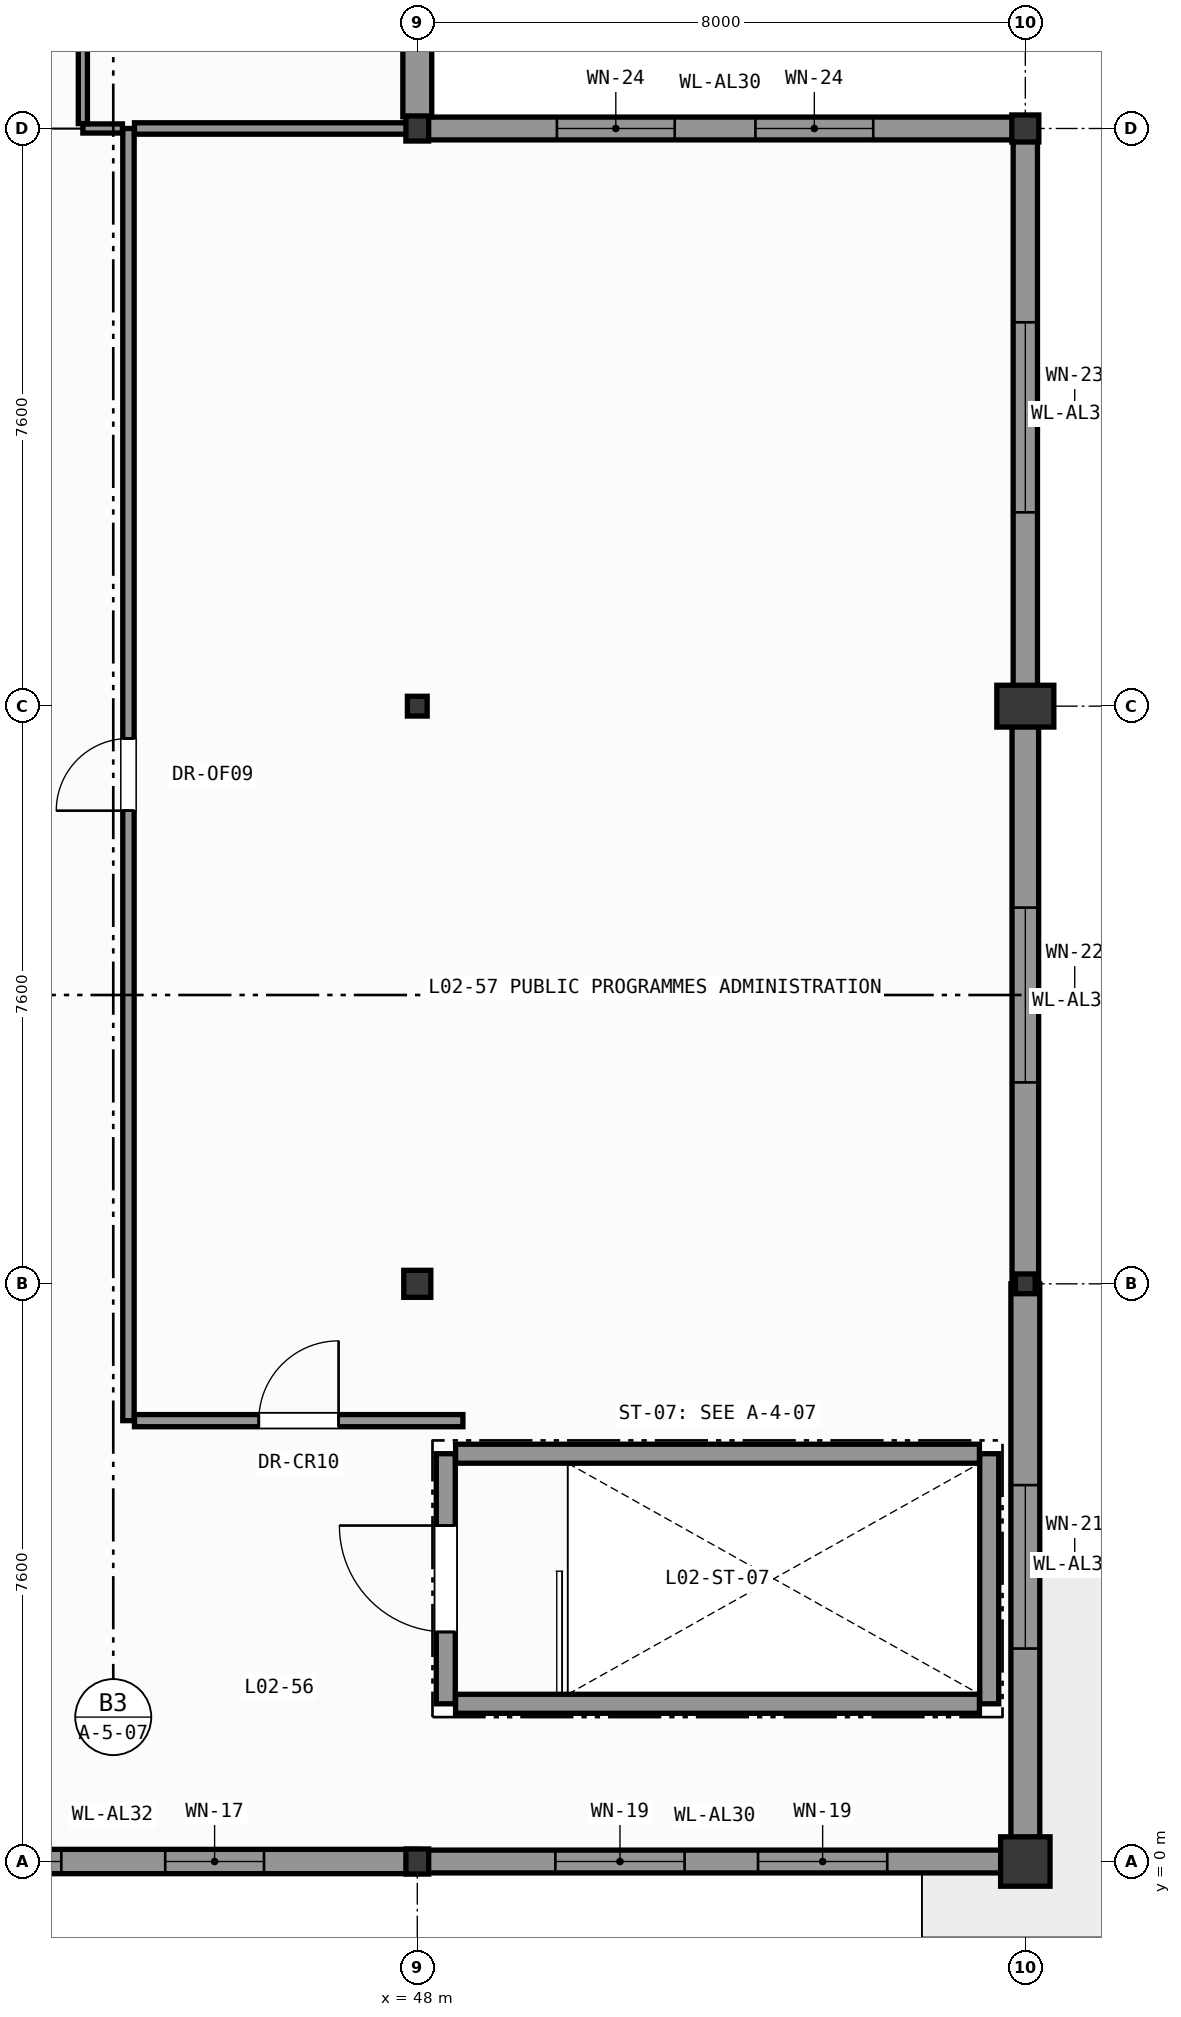
"""IFC4 building model, lengths in metres.
Left out: names, types, materials, properties, quantities, classifications, styles, units other than length and angle.
Written with IfcOpenShell. Run it as: python <this file> out.ifc"""

import sys

from ifc_helpers import new_model, si_unit, direction, frame, frame_2d, origin, origin_2d, place, context, subcontext, project, spatial, rectangle, hollow_rectangle, hollow_circle, i_section, extrude, element, fill, save


model = new_model("IFC4")
c1 = context("Model", 3, precision=1e-05, world=origin(), true_north=direction((0.0, 1.0)))
c2 = subcontext(c1, "Body", "Model", "MODEL_VIEW")
j1 = project(units=[si_unit("LENGTHUNIT", "METRE"), si_unit("PLANEANGLEUNIT", "RADIAN")], contexts=[c1])
p1 = place(None, origin())
s1 = spatial("IfcSite", under=j1, at=p1, CompositionType="ELEMENT")
p2 = place(p1, origin())
s2 = spatial("IfcBuilding", under=s1, at=p2, CompositionType="ELEMENT")
p3 = place(p2, frame((0.0, 0.0, 7.8)))
s3 = spatial("IfcBuildingStorey", under=s2, at=p3, CompositionType="ELEMENT", Elevation=7.8)
p4 = place(p3, frame((48.0, 0.0, 0.0), z_axis=(0.0, 0.0, 1.0), x_axis=(1.0, 0.0, 0.0)))
e1 = element("IfcColumn", 1, at=p4, inside=s3, PredefinedType="COLUMN", context=c2, shape_type="SweptSolid", body=[
    extrude(i_section(OverallWidth=0.3, OverallDepth=0.33, WebThickness=0.01, FlangeThickness=0.017, FilletRadius=0.027, at=origin_2d()), origin(), (0.0, 0.0, 1.0), 5.4),
])
p5 = place(p3, frame((48.0, 7.6, 0.0), z_axis=(0.0, 0.0, 1.0), x_axis=(1.0, 0.0, 0.0)))
e2 = element("IfcColumn", 2, at=p5, inside=s3, PredefinedType="COLUMN", context=c2, shape_type="SweptSolid", body=[
    extrude(hollow_circle(Radius=0.178, WallThickness=0.016, at=origin_2d()), origin(), (0.0, 0.0, 1.0), 5.4),
])
p6 = place(p3, frame((48.0, 15.2, 0.0), z_axis=(0.0, 0.0, 1.0), x_axis=(1.0, 0.0, 0.0)))
e3 = element("IfcColumn", 3, at=p6, inside=s3, PredefinedType="COLUMN", context=c2, shape_type="SweptSolid", body=[
    extrude(hollow_rectangle(XDim=0.26, YDim=0.26, WallThickness=0.012, InnerFilletRadius=0.012, OuterFilletRadius=0.025, at=origin_2d()), origin(), (0.0, 0.0, 1.0), 5.4),
])
p7 = place(p3, frame((48.0, 22.8, 0.0), z_axis=(0.0, 0.0, 1.0), x_axis=(1.0, 0.0, 0.0)))
e4 = element("IfcColumn", 4, at=p7, inside=s3, PredefinedType="COLUMN", context=c2, shape_type="SweptSolid", body=[
    extrude(i_section(OverallWidth=0.3, OverallDepth=0.33, WebThickness=0.01, FlangeThickness=0.017, FilletRadius=0.027, at=origin_2d()), origin(), (0.0, 0.0, 1.0), 5.4),
])
p8 = place(p3, frame((56.0, 0.0, 0.0), z_axis=(0.0, 0.0, 1.0), x_axis=(1.0, 0.0, 0.0)))
e5 = element("IfcColumn", 5, at=p8, inside=s3, PredefinedType="PILASTER", context=c2, shape_type="SweptSolid", body=[
    extrude(rectangle(XDim=0.65, YDim=0.65, at=origin_2d()), origin(), (0.0, 0.0, 1.0), 5.4),
])
p9 = place(p3, frame((56.0, 7.6, 0.0), z_axis=(0.0, 0.0, 1.0), x_axis=(1.0, 0.0, 0.0)))
e6 = element("IfcColumn", 6, at=p9, inside=s3, PredefinedType="COLUMN", context=c2, shape_type="SweptSolid", body=[
    extrude(hollow_rectangle(XDim=0.26, YDim=0.26, WallThickness=0.012, InnerFilletRadius=0.012, OuterFilletRadius=0.025, at=origin_2d()), origin(), (0.0, 0.0, 1.0), 5.4),
])
p10 = place(p3, frame((56.0, 15.2, 0.0), z_axis=(0.0, 0.0, 1.0), x_axis=(1.0, 0.0, 0.0)))
e7 = element("IfcColumn", 7, at=p10, inside=s3, PredefinedType="PILASTER", context=c2, shape_type="SweptSolid", body=[
    extrude(rectangle(XDim=0.75, YDim=0.55, at=origin_2d()), origin(), (0.0, 0.0, 1.0), 5.4),
])
p11 = place(p3, frame((56.0, 22.8, 0.0), z_axis=(0.0, 0.0, 1.0), x_axis=(1.0, 0.0, 0.0)))
e8 = element("IfcColumn", 8, at=p11, inside=s3, PredefinedType="COLUMN", context=c2, shape_type="SweptSolid", body=[
    extrude(hollow_circle(Radius=0.178, WallThickness=0.016, at=origin_2d()), origin(), (0.0, 0.0, 1.0), 5.4),
])
p12 = place(p3, frame((48.0, 0.0, 0.0), z_axis=(0.0, 0.0, 1.0), x_axis=(-1.0, 0.0, 0.0)))
e9 = element("IfcWall", 9, at=p12, inside=s3, PredefinedType="SOLIDWALL", context=c2, shape_type="SweptSolid", body=[
    extrude(rectangle(XDim=8.0, YDim=0.32, at=frame_2d((4.0, 0.0))), origin(), (0.0, 0.0, 1.0), 4.745),
])
p13 = place(p12, frame((2.017, 0.0, 0.95)))
e10 = element("IfcOpeningElement", 10, at=p13, cuts=e9, PredefinedType="OPENING", context=c2, shape_type="SweptSolid", body=[
    extrude(rectangle(XDim=1.3, YDim=2.3, at=frame_2d((0.65, 1.15))), frame((0.0, 0.17, 0.0), z_axis=(0.0, -1.0, 0.0), x_axis=(1.0, 0.0, 0.0)), (0.0, 0.0, 1.0), 0.34),
])
p14 = place(p12, frame((4.683, 0.0, 0.95)))
e11 = element("IfcOpeningElement", 11, at=p14, cuts=e9, PredefinedType="OPENING", context=c2, shape_type="SweptSolid", body=[
    extrude(rectangle(XDim=1.3, YDim=2.3, at=frame_2d((0.65, 1.15))), frame((0.0, 0.17, 0.0), z_axis=(0.0, -1.0, 0.0), x_axis=(1.0, 0.0, 0.0)), (0.0, 0.0, 1.0), 0.34),
])
p15 = place(p3, frame((56.0, 0.0, 0.0), z_axis=(0.0, 0.0, 1.0), x_axis=(-1.0, 0.0, 0.0)))
e12 = element("IfcWall", 12, at=p15, inside=s3, PredefinedType="SOLIDWALL", context=c2, shape_type="SweptSolid", body=[
    extrude(rectangle(XDim=8.0, YDim=0.3, at=frame_2d((4.0, 0.0))), origin(), (0.0, 0.0, 1.0), 4.745),
])
p16 = place(p15, frame((1.817, 0.0, 0.95)))
e13 = element("IfcOpeningElement", 13, at=p16, cuts=e12, PredefinedType="OPENING", context=c2, shape_type="SweptSolid", body=[
    extrude(rectangle(XDim=1.7, YDim=2.7, at=frame_2d((0.85, 1.35))), frame((0.0, 0.16, 0.0), z_axis=(0.0, -1.0, 0.0), x_axis=(1.0, 0.0, 0.0)), (0.0, 0.0, 1.0), 0.32),
])
p17 = place(p15, frame((4.483, 0.0, 0.95)))
e14 = element("IfcOpeningElement", 14, at=p17, cuts=e12, PredefinedType="OPENING", context=c2, shape_type="SweptSolid", body=[
    extrude(rectangle(XDim=1.7, YDim=2.7, at=frame_2d((0.85, 1.35))), frame((0.0, 0.16, 0.0), z_axis=(0.0, -1.0, 0.0), x_axis=(1.0, 0.0, 0.0)), (0.0, 0.0, 1.0), 0.32),
])
p18 = place(p3, frame((56.0, 7.6, 0.0), z_axis=(0.0, 0.0, 1.0), x_axis=(0.0, -1.0, 0.0)))
e15 = element("IfcWall", 15, at=p18, inside=s3, PredefinedType="SOLIDWALL", context=c2, shape_type="SweptSolid", body=[
    extrude(rectangle(XDim=7.446, YDim=0.38, at=frame_2d((3.723, 0.0))), origin(), (0.0, 0.0, 1.0), 4.635),
])
p19 = place(p18, frame((2.648, 0.0, 0.95)))
e16 = element("IfcOpeningElement", 16, at=p19, cuts=e15, PredefinedType="OPENING", context=c2, shape_type="SweptSolid", body=[
    extrude(rectangle(XDim=2.15, YDim=3.1, at=frame_2d((1.075, 1.55))), frame((0.0, 0.2, 0.0), z_axis=(0.0, -1.0, 0.0), x_axis=(1.0, 0.0, 0.0)), (0.0, 0.0, 1.0), 0.4),
])
p20 = place(p3, frame((56.0, 15.2, 0.0), z_axis=(0.0, 0.0, 1.0), x_axis=(0.0, -1.0, 0.0)))
e17 = element("IfcWall", 17, at=p20, inside=s3, PredefinedType="SOLIDWALL", context=c2, shape_type="SweptSolid", body=[
    extrude(rectangle(XDim=7.6, YDim=0.35, at=frame_2d((3.8, 0.0))), origin(), (0.0, 0.0, 1.0), 4.635),
])
p21 = place(p20, frame((2.65, 0.0, 0.95)))
e18 = element("IfcOpeningElement", 18, at=p21, cuts=e17, PredefinedType="OPENING", context=c2, shape_type="SweptSolid", body=[
    extrude(rectangle(XDim=2.3, YDim=3.29, at=frame_2d((1.15, 1.645))), frame((0.0, 0.185, 0.0), z_axis=(0.0, -1.0, 0.0), x_axis=(1.0, 0.0, 0.0)), (0.0, 0.0, 1.0), 0.37),
])
p22 = place(p3, frame((56.0, 22.8, 0.0), z_axis=(0.0, 0.0, 1.0), x_axis=(0.0, -1.0, 0.0)))
e19 = element("IfcWall", 19, at=p22, inside=s3, PredefinedType="SOLIDWALL", context=c2, shape_type="SweptSolid", body=[
    extrude(rectangle(XDim=7.6, YDim=0.32, at=frame_2d((3.8, 0.0))), origin(), (0.0, 0.0, 1.0), 4.635),
])
p23 = place(p22, frame((2.55, 0.0, 0.95)))
e20 = element("IfcOpeningElement", 20, at=p23, cuts=e19, PredefinedType="OPENING", context=c2, shape_type="SweptSolid", body=[
    extrude(rectangle(XDim=2.5, YDim=3.29, at=frame_2d((1.25, 1.645))), frame((0.0, 0.17, 0.0), z_axis=(0.0, -1.0, 0.0), x_axis=(1.0, 0.0, 0.0)), (0.0, 0.0, 1.0), 0.34),
])
p24 = place(p3, frame((48.0, 22.8, 0.0), z_axis=(0.0, 0.0, 1.0), x_axis=(1.0, 0.0, 0.0)))
e21 = element("IfcWall", 21, at=p24, inside=s3, PredefinedType="SOLIDWALL", context=c2, shape_type="SweptSolid", body=[
    extrude(rectangle(XDim=7.836, YDim=0.3, at=frame_2d((3.918, 0.0))), origin(), (0.0, 0.0, 1.0), 4.785),
])
p25 = place(p24, frame((1.837, 0.0, 0.95)))
e22 = element("IfcOpeningElement", 22, at=p25, cuts=e21, PredefinedType="OPENING", context=c2, shape_type="SweptSolid", body=[
    extrude(rectangle(XDim=1.55, YDim=2.1, at=frame_2d((0.775, 1.05))), frame((0.0, 0.16, 0.0), z_axis=(0.0, -1.0, 0.0), x_axis=(1.0, 0.0, 0.0)), (0.0, 0.0, 1.0), 0.32),
])
p26 = place(p24, frame((4.449, 0.0, 0.95)))
e23 = element("IfcOpeningElement", 23, at=p26, cuts=e21, PredefinedType="OPENING", context=c2, shape_type="SweptSolid", body=[
    extrude(rectangle(XDim=1.55, YDim=2.1, at=frame_2d((0.775, 1.05))), frame((0.0, 0.16, 0.0), z_axis=(0.0, -1.0, 0.0), x_axis=(1.0, 0.0, 0.0)), (0.0, 0.0, 1.0), 0.32),
])
p27 = place(p3, frame((48.0, 30.4, 0.0), z_axis=(0.0, 0.0, 1.0), x_axis=(0.0, -1.0, 0.0)))
e24 = element("IfcWall", 24, at=p27, inside=s3, PredefinedType="SOLIDWALL", context=c2, shape_type="SweptSolid", body=[
    extrude(rectangle(XDim=7.446, YDim=0.38, at=frame_2d((3.723, 0.0))), origin(), (0.0, 0.0, 1.0), 4.685),
])
p28 = place(p27, frame((1.507, 0.0, 0.95)))
e25 = element("IfcOpeningElement", 25, at=p28, cuts=e24, PredefinedType="OPENING", context=c2, shape_type="SweptSolid", body=[
    extrude(rectangle(XDim=1.95, YDim=2.55, at=frame_2d((0.975, 1.275))), frame((0.0, 0.2, 0.0), z_axis=(0.0, -1.0, 0.0), x_axis=(1.0, 0.0, 0.0)), (0.0, 0.0, 1.0), 0.4),
])
p29 = place(p27, frame((3.989, 0.0, 0.95)))
e26 = element("IfcOpeningElement", 26, at=p29, cuts=e24, PredefinedType="OPENING", context=c2, shape_type="SweptSolid", body=[
    extrude(rectangle(XDim=1.95, YDim=2.55, at=frame_2d((0.975, 1.275))), frame((0.0, 0.2, 0.0), z_axis=(0.0, -1.0, 0.0), x_axis=(1.0, 0.0, 0.0)), (0.0, 0.0, 1.0), 0.4),
])
p30 = place(p3, frame((48.375, 2.075, 0.0), z_axis=(0.0, 0.0, 1.0), x_axis=(0.0, 1.0, 0.0)))
e27 = element("IfcWall", 27, at=p30, inside=s3, PredefinedType="SHEAR", context=c2, shape_type="SweptSolid", body=[
    extrude(rectangle(XDim=3.29, YDim=0.25, at=frame_2d((1.645, 0.0))), origin(), (0.0, 0.0, 1.0), 5.15),
])
p31 = place(p30, frame((0.945, 0.0, 0.0)))
e28 = element("IfcOpeningElement", 28, at=p31, cuts=e27, PredefinedType="OPENING", context=c2, shape_type="SweptSolid", body=[
    extrude(rectangle(XDim=1.4, YDim=2.2, at=frame_2d((0.7, 1.1))), frame((0.0, 0.135, 0.0), z_axis=(0.0, -1.0, 0.0), x_axis=(1.0, 0.0, 0.0)), (0.0, 0.0, 1.0), 0.27),
])
p32 = place(p3, frame((55.525, 2.075, 0.0), z_axis=(0.0, 0.0, 1.0), x_axis=(0.0, 1.0, 0.0)))
e29 = element("IfcWall", 29, at=p32, inside=s3, PredefinedType="SHEAR", context=c2, shape_type="SweptSolid", body=[
    extrude(rectangle(XDim=3.29, YDim=0.25, at=frame_2d((1.645, 0.0))), origin(), (0.0, 0.0, 1.0), 5.15),
])
for number, where, z_axis, x_axis in (
    (30, (48.504, 2.075, 0.0), (0.0, 0.0, 1.0), (1.0, 0.0, 0.0)),
    (31, (48.504, 5.365, 0.0), (0.0, 0.0, 1.0), (1.0, 0.0, 0.0)),
):
    element("IfcWall", number, at=place(p3, frame(where, z_axis=z_axis, x_axis=x_axis)), inside=s3, PredefinedType="SHEAR", context=c2, shape_type="SweptSolid", body=[
        extrude(rectangle(XDim=6.892, YDim=0.25, at=frame_2d((3.446, 0.0))), origin(), (0.0, 0.0, 1.0), 5.15),
    ])
p33 = place(p3, frame((44.2, 5.8, 0.0), z_axis=(0.0, 0.0, 1.0), x_axis=(0.0, 1.0, 0.0)))
e32 = element("IfcWall", 32, at=p33, inside=s3, PredefinedType="PARTITIONING", context=c2, shape_type="SweptSolid", body=[
    extrude(rectangle(XDim=17.0, YDim=0.15, at=frame_2d((8.5, 0.0))), origin(), (0.0, 0.0, 1.0), 5.15),
])
p34 = place(p33, frame((8.025, 0.0, 0.0)))
e33 = element("IfcOpeningElement", 33, at=p34, cuts=e32, PredefinedType="OPENING", context=c2, shape_type="SweptSolid", body=[
    extrude(rectangle(XDim=0.95, YDim=2.1, at=frame_2d((0.475, 1.05))), frame((0.0, 0.085, 0.0), z_axis=(0.0, -1.0, 0.0), x_axis=(1.0, 0.0, 0.0)), (0.0, 0.0, 1.0), 0.17),
])
p35 = place(p3, frame((43.6, 22.8, 0.0), z_axis=(0.0, 0.0, 1.0), x_axis=(1.0, 0.0, 0.0)))
e34 = element("IfcWall", 34, at=p35, inside=s3, PredefinedType="PARTITIONING", context=c2, shape_type="SweptSolid", body=[
    extrude(rectangle(XDim=0.521, YDim=0.12, at=frame_2d((0.26, 0.0))), origin(), (0.0, 0.0, 1.0), 4.785),
])
p36 = place(p3, frame((44.279, 5.8, 0.0), z_axis=(0.0, 0.0, 1.0), x_axis=(1.0, 0.0, 0.0)))
e35 = element("IfcWall", 35, at=p36, inside=s3, PredefinedType="PARTITIONING", context=c2, shape_type="SweptSolid", body=[
    extrude(rectangle(XDim=4.321, YDim=0.16, at=frame_2d((2.161, 0.0))), origin(), (0.0, 0.0, 1.0), 5.15),
])
p37 = place(p36, frame((1.635, 0.0, 0.0)))
e36 = element("IfcOpeningElement", 36, at=p37, cuts=e35, PredefinedType="OPENING", context=c2, shape_type="SweptSolid", body=[
    extrude(rectangle(XDim=1.05, YDim=2.2, at=frame_2d((0.525, 1.1))), frame((0.0, 0.09, 0.0), z_axis=(0.0, -1.0, 0.0), x_axis=(1.0, 0.0, 0.0)), (0.0, 0.0, 1.0), 0.18),
])
p38 = place(p3, frame((44.279, 22.8, 0.0), z_axis=(0.0, 0.0, 1.0), x_axis=(1.0, 0.0, 0.0)))
e37 = element("IfcWall", 37, at=p38, inside=s3, PredefinedType="PARTITIONING", context=c2, shape_type="SweptSolid", body=[
    extrude(rectangle(XDim=3.721, YDim=0.15, at=frame_2d((1.86, 0.0))), origin(), (0.0, 0.0, 1.0), 4.785),
])
p39 = place(p3, frame((43.6, 22.864, 0.0), z_axis=(0.0, 0.0, 1.0), x_axis=(0.0, 1.0, 0.0)))
e38 = element("IfcWall", 38, at=p39, inside=s3, PredefinedType="PARTITIONING", context=c2, shape_type="SweptSolid", body=[
    extrude(rectangle(XDim=29.652, YDim=0.12, at=frame_2d((14.826, 0.0))), origin(), (0.0, 0.0, 1.0), 5.15),
])
p40 = place(p39, frame((13.726, 0.0, 0.0)))
e39 = element("IfcOpeningElement", 39, at=p40, cuts=e38, PredefinedType="OPENING", context=c2, shape_type="SweptSolid", body=[
    extrude(rectangle(XDim=2.2, YDim=2.6, at=frame_2d((1.1, 1.3))), frame((0.0, 0.07, 0.0), z_axis=(0.0, -1.0, 0.0), x_axis=(1.0, 0.0, 0.0)), (0.0, 0.0, 1.0), 0.14),
])
p41 = place(p13, origin())
e40 = element("IfcWindow", 40, at=p41, inside=s3, PartitioningType="SINGLE_PANEL", PredefinedType="WINDOW", context=c2, shape_type="SweptSolid", body=[
    extrude(rectangle(XDim=1.3, YDim=2.3, at=frame_2d((0.65, 1.15))), frame((0.0, 0.03, 0.0), z_axis=(0.0, -1.0, 0.0), x_axis=(1.0, 0.0, 0.0)), (0.0, 0.0, 1.0), 0.06),
])
fill(e10, e40)
p42 = place(p14, origin())
e41 = element("IfcWindow", 41, at=p42, inside=s3, PartitioningType="SINGLE_PANEL", PredefinedType="WINDOW", context=c2, shape_type="SweptSolid", body=[
    extrude(rectangle(XDim=1.3, YDim=2.3, at=frame_2d((0.65, 1.15))), frame((0.0, 0.03, 0.0), z_axis=(0.0, -1.0, 0.0), x_axis=(1.0, 0.0, 0.0)), (0.0, 0.0, 1.0), 0.06),
])
fill(e11, e41)
p43 = place(p16, origin())
e42 = element("IfcWindow", 42, at=p43, inside=s3, PartitioningType="SINGLE_PANEL", PredefinedType="WINDOW", context=c2, shape_type="SweptSolid", body=[
    extrude(rectangle(XDim=1.7, YDim=2.7, at=frame_2d((0.85, 1.35))), frame((0.0, 0.03, 0.0), z_axis=(0.0, -1.0, 0.0), x_axis=(1.0, 0.0, 0.0)), (0.0, 0.0, 1.0), 0.06),
])
fill(e13, e42)
p44 = place(p17, origin())
e43 = element("IfcWindow", 43, at=p44, inside=s3, PartitioningType="SINGLE_PANEL", PredefinedType="WINDOW", context=c2, shape_type="SweptSolid", body=[
    extrude(rectangle(XDim=1.7, YDim=2.7, at=frame_2d((0.85, 1.35))), frame((0.0, 0.03, 0.0), z_axis=(0.0, -1.0, 0.0), x_axis=(1.0, 0.0, 0.0)), (0.0, 0.0, 1.0), 0.06),
])
fill(e14, e43)
p45 = place(p19, origin())
e44 = element("IfcWindow", 44, at=p45, inside=s3, PartitioningType="SINGLE_PANEL", PredefinedType="WINDOW", context=c2, shape_type="SweptSolid", body=[
    extrude(rectangle(XDim=2.15, YDim=3.1, at=frame_2d((1.075, 1.55))), frame((0.0, 0.03, 0.0), z_axis=(0.0, -1.0, 0.0), x_axis=(1.0, 0.0, 0.0)), (0.0, 0.0, 1.0), 0.06),
])
fill(e16, e44)
p46 = place(p21, origin())
e45 = element("IfcWindow", 45, at=p46, inside=s3, PartitioningType="SINGLE_PANEL", PredefinedType="WINDOW", context=c2, shape_type="SweptSolid", body=[
    extrude(rectangle(XDim=2.3, YDim=3.29, at=frame_2d((1.15, 1.645))), frame((0.0, 0.03, 0.0), z_axis=(0.0, -1.0, 0.0), x_axis=(1.0, 0.0, 0.0)), (0.0, 0.0, 1.0), 0.06),
])
fill(e18, e45)
p47 = place(p23, origin())
e46 = element("IfcWindow", 46, at=p47, inside=s3, PartitioningType="SINGLE_PANEL", PredefinedType="WINDOW", context=c2, shape_type="SweptSolid", body=[
    extrude(rectangle(XDim=2.5, YDim=3.29, at=frame_2d((1.25, 1.645))), frame((0.0, 0.03, 0.0), z_axis=(0.0, -1.0, 0.0), x_axis=(1.0, 0.0, 0.0)), (0.0, 0.0, 1.0), 0.06),
])
fill(e20, e46)
p48 = place(p25, origin())
e47 = element("IfcWindow", 47, at=p48, inside=s3, PartitioningType="SINGLE_PANEL", PredefinedType="WINDOW", context=c2, shape_type="SweptSolid", body=[
    extrude(rectangle(XDim=1.55, YDim=2.1, at=frame_2d((0.775, 1.05))), frame((0.0, 0.03, 0.0), z_axis=(0.0, -1.0, 0.0), x_axis=(1.0, 0.0, 0.0)), (0.0, 0.0, 1.0), 0.06),
])
fill(e22, e47)
p49 = place(p26, origin())
e48 = element("IfcWindow", 48, at=p49, inside=s3, PartitioningType="SINGLE_PANEL", PredefinedType="WINDOW", context=c2, shape_type="SweptSolid", body=[
    extrude(rectangle(XDim=1.55, YDim=2.1, at=frame_2d((0.775, 1.05))), frame((0.0, 0.03, 0.0), z_axis=(0.0, -1.0, 0.0), x_axis=(1.0, 0.0, 0.0)), (0.0, 0.0, 1.0), 0.06),
])
fill(e23, e48)
p50 = place(p31, origin())
e49 = element("IfcDoor", 49, at=p50, inside=s3, OperationType="SINGLE_SWING_RIGHT", PredefinedType="DOOR", context=c2, shape_type="SweptSolid", body=[
    extrude(rectangle(XDim=1.4, YDim=2.2, at=frame_2d((0.7, 1.1))), frame((0.0, 0.025, 0.0), z_axis=(0.0, -1.0, 0.0), x_axis=(1.0, 0.0, 0.0)), (0.0, 0.0, 1.0), 0.05),
])
fill(e28, e49)
p51 = place(p34, origin())
e50 = element("IfcDoor", 50, at=p51, inside=s3, OperationType="SINGLE_SWING_LEFT", PredefinedType="DOOR", context=c2, shape_type="SweptSolid", body=[
    extrude(rectangle(XDim=0.95, YDim=2.1, at=frame_2d((0.475, 1.05))), frame((0.0, 0.025, 0.0), z_axis=(0.0, -1.0, 0.0), x_axis=(1.0, 0.0, 0.0)), (0.0, 0.0, 1.0), 0.05),
])
fill(e33, e50)
p52 = place(p37, origin())
e51 = element("IfcDoor", 51, at=p52, inside=s3, OperationType="SINGLE_SWING_RIGHT", PredefinedType="DOOR", context=c2, shape_type="SweptSolid", body=[
    extrude(rectangle(XDim=1.05, YDim=2.2, at=frame_2d((0.525, 1.1))), frame((0.0, 0.025, 0.0), z_axis=(0.0, -1.0, 0.0), x_axis=(1.0, 0.0, 0.0)), (0.0, 0.0, 1.0), 0.05),
])
fill(e36, e51)
save(model, sys.argv[1])
